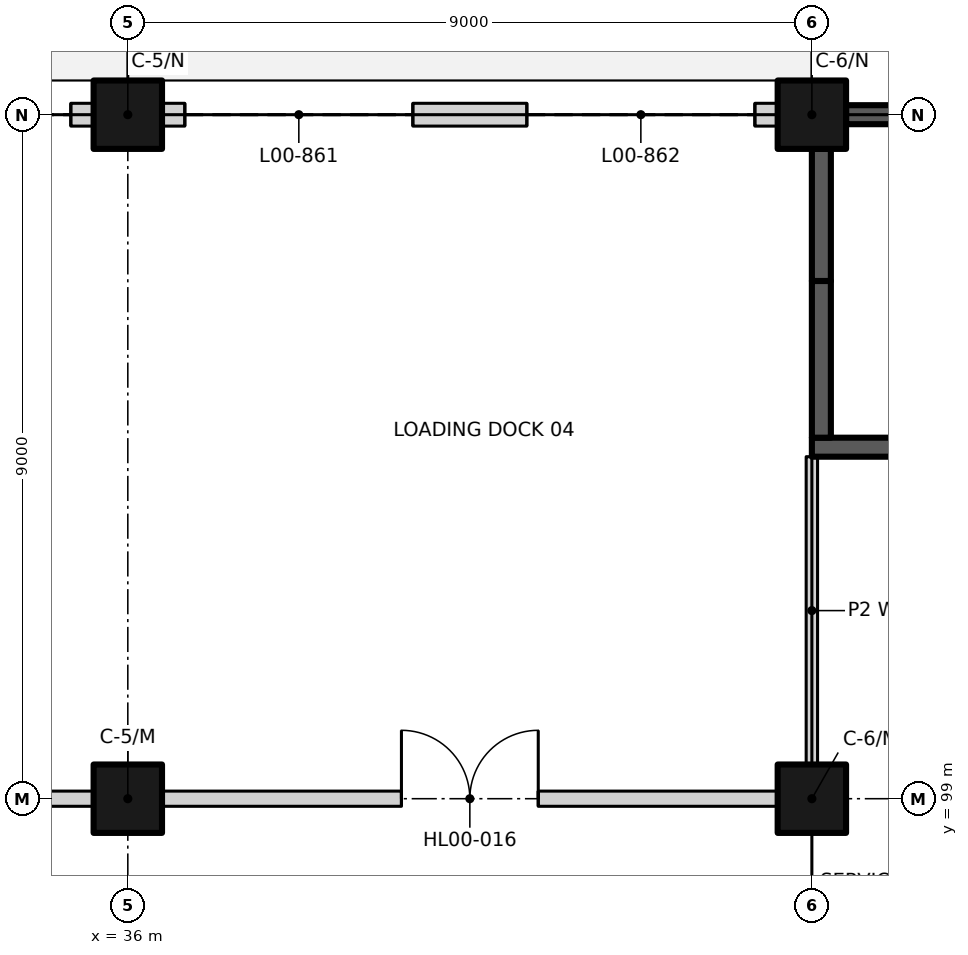
"""IFC4 building model, lengths in metres.
Left out: names, types, materials, properties, quantities, classifications, styles, units other than length and angle.
Written with IfcOpenShell. Run it as: python <this file> out.ifc"""

import sys

from ifc_helpers import new_model, si_unit, direction, frame, frame_2d, origin, origin_2d, place, context, subcontext, project, spatial, rectangle, extrude, element, fill, save


model = new_model("IFC4")
c1 = context("Model", 3, precision=1e-05, world=origin(), true_north=direction((0.0, 1.0)))
c2 = subcontext(c1, "Body", "Model", "MODEL_VIEW")
j1 = project(units=[si_unit("LENGTHUNIT", "METRE"), si_unit("PLANEANGLEUNIT", "RADIAN")], contexts=[c1])
p1 = place(None, origin())
s1 = spatial("IfcSite", under=j1, at=p1, CompositionType="ELEMENT")
p2 = place(p1, origin())
s2 = spatial("IfcBuilding", under=s1, at=p2, CompositionType="ELEMENT")
p3 = place(p2, origin())
s3 = spatial("IfcBuildingStorey", under=s2, at=p3, CompositionType="ELEMENT", Elevation=0.0)
for number, where, z_axis, x_axis in (
    (1, (36.0, 99.0, 0.0), (0.0, 0.0, 1.0), (1.0, 0.0, 0.0)),
    (2, (45.0, 99.0, 0.0), (0.0, 0.0, 1.0), (1.0, 0.0, 0.0)),
    (3, (36.0, 108.0, 0.0), (0.0, 0.0, 1.0), (1.0, 0.0, 0.0)),
    (4, (45.0, 108.0, 0.0), (0.0, 0.0, 1.0), (1.0, 0.0, 0.0)),
):
    element("IfcColumn", number, at=place(p3, frame(where, z_axis=z_axis, x_axis=x_axis)), inside=s3, PredefinedType="COLUMN", context=c2, shape_type="SweptSolid", body=[
        extrude(rectangle(XDim=0.9, YDim=0.9, at=origin_2d()), origin(), (0.0, 0.0, 1.0), 6.0),
    ])
p4 = place(p3, frame((45.0, 103.625, 0.0), z_axis=(0.0, 0.0, 1.0), x_axis=(1.0, 0.0, 0.0)))
e5 = element("IfcWall", 5, at=p4, inside=s3, PredefinedType="SHEAR", context=c2, shape_type="SweptSolid", body=[
    extrude(rectangle(XDim=9.0, YDim=0.25, at=frame_2d((4.5, 0.0))), origin(), (0.0, 0.0, 1.0), 6.0),
])
p5 = place(p3, frame((45.45, 108.0, 0.0), z_axis=(0.0, 0.0, 1.0), x_axis=(1.0, 0.0, 0.0)))
e6 = element("IfcWall", 6, at=p5, inside=s3, PredefinedType="SHEAR", context=c2, shape_type="SweptSolid", body=[
    extrude(rectangle(XDim=8.1, YDim=0.25, at=frame_2d((4.05, 0.0))), origin(), (0.0, 0.0, 1.0), 6.0),
])
p6 = place(p5, frame((6.55, 0.0, 0.0)))
e7 = element("IfcOpeningElement", 7, at=p6, cuts=e6, PredefinedType="OPENING", context=c2, shape_type="SweptSolid", body=[
    extrude(rectangle(XDim=1.4, YDim=2.1, at=frame_2d((0.7, 1.05))), frame((0.0, 0.135, 0.0), z_axis=(0.0, -1.0, 0.0), x_axis=(1.0, 0.0, 0.0)), (0.0, 0.0, 1.0), 0.27),
])
p7 = place(p3, frame((45.125, 103.75, 0.0), z_axis=(0.0, 0.0, 1.0), x_axis=(0.0, 1.0, 0.0)))
e8 = element("IfcWall", 8, at=p7, inside=s3, PredefinedType="SHEAR", context=c2, shape_type="SweptSolid", body=[
    extrude(rectangle(XDim=2.062, YDim=0.25, at=frame_2d((1.031, 0.0))), origin(), (0.0, 0.0, 1.0), 6.0),
])
p8 = place(p3, frame((45.125, 105.812, 0.0), z_axis=(0.0, 0.0, 1.0), x_axis=(0.0, 1.0, 0.0)))
e9 = element("IfcWall", 9, at=p8, inside=s3, PredefinedType="SHEAR", context=c2, shape_type="SweptSolid", body=[
    extrude(rectangle(XDim=1.738, YDim=0.25, at=frame_2d((0.869, 0.0))), origin(), (0.0, 0.0, 1.0), 6.0),
])
p9 = place(p3, frame((27.45, 108.0, 0.0), z_axis=(0.0, 0.0, 1.0), x_axis=(1.0, 0.0, 0.0)))
e10 = element("IfcWall", 10, at=p9, inside=s3, PredefinedType="SOLIDWALL", context=c2, shape_type="SweptSolid", body=[
    extrude(rectangle(XDim=8.1, YDim=0.3, at=frame_2d((4.05, 0.0))), origin(), (0.0, 0.0, 1.0), 5.2),
])
p10 = place(p9, frame((0.3, 0.0, 0.0)))
e11 = element("IfcOpeningElement", 11, at=p10, cuts=e10, PredefinedType="OPENING", context=c2, shape_type="SweptSolid", body=[
    extrude(rectangle(XDim=3.0, YDim=4.2, at=frame_2d((1.5, 2.1))), frame((0.0, 0.16, 0.0), z_axis=(0.0, -1.0, 0.0), x_axis=(1.0, 0.0, 0.0)), (0.0, 0.0, 1.0), 0.32),
])
p11 = place(p9, frame((4.8, 0.0, 0.0)))
e12 = element("IfcOpeningElement", 12, at=p11, cuts=e10, PredefinedType="OPENING", context=c2, shape_type="SweptSolid", body=[
    extrude(rectangle(XDim=3.0, YDim=4.2, at=frame_2d((1.5, 2.1))), frame((0.0, 0.16, 0.0), z_axis=(0.0, -1.0, 0.0), x_axis=(1.0, 0.0, 0.0)), (0.0, 0.0, 1.0), 0.32),
])
p12 = place(p3, frame((36.45, 108.0, 0.0), z_axis=(0.0, 0.0, 1.0), x_axis=(1.0, 0.0, 0.0)))
e13 = element("IfcWall", 13, at=p12, inside=s3, PredefinedType="SOLIDWALL", context=c2, shape_type="SweptSolid", body=[
    extrude(rectangle(XDim=8.1, YDim=0.3, at=frame_2d((4.05, 0.0))), origin(), (0.0, 0.0, 1.0), 5.2),
])
p13 = place(p12, frame((0.3, 0.0, 0.0)))
e14 = element("IfcOpeningElement", 14, at=p13, cuts=e13, PredefinedType="OPENING", context=c2, shape_type="SweptSolid", body=[
    extrude(rectangle(XDim=3.0, YDim=4.2, at=frame_2d((1.5, 2.1))), frame((0.0, 0.16, 0.0), z_axis=(0.0, -1.0, 0.0), x_axis=(1.0, 0.0, 0.0)), (0.0, 0.0, 1.0), 0.32),
])
p14 = place(p12, frame((4.8, 0.0, 0.0)))
e15 = element("IfcOpeningElement", 15, at=p14, cuts=e13, PredefinedType="OPENING", context=c2, shape_type="SweptSolid", body=[
    extrude(rectangle(XDim=3.0, YDim=4.2, at=frame_2d((1.5, 2.1))), frame((0.0, 0.16, 0.0), z_axis=(0.0, -1.0, 0.0), x_axis=(1.0, 0.0, 0.0)), (0.0, 0.0, 1.0), 0.32),
])
p15 = place(p3, frame((27.45, 99.0, 0.0), z_axis=(0.0, 0.0, 1.0), x_axis=(1.0, 0.0, 0.0)))
e16 = element("IfcWall", 16, at=p15, inside=s3, PredefinedType="PARTITIONING", context=c2, shape_type="SweptSolid", body=[
    extrude(rectangle(XDim=8.1, YDim=0.2, at=frame_2d((4.05, 0.0))), origin(), (0.0, 0.0, 1.0), 5.7),
])
p16 = place(p15, frame((3.15, 0.0, 0.0)))
e17 = element("IfcOpeningElement", 17, at=p16, cuts=e16, PredefinedType="OPENING", context=c2, shape_type="SweptSolid", body=[
    extrude(rectangle(XDim=1.8, YDim=2.4, at=frame_2d((0.9, 1.2))), frame((0.0, 0.11, 0.0), z_axis=(0.0, -1.0, 0.0), x_axis=(1.0, 0.0, 0.0)), (0.0, 0.0, 1.0), 0.22),
])
p17 = place(p3, frame((36.45, 99.0, 0.0), z_axis=(0.0, 0.0, 1.0), x_axis=(1.0, 0.0, 0.0)))
e18 = element("IfcWall", 18, at=p17, inside=s3, PredefinedType="PARTITIONING", context=c2, shape_type="SweptSolid", body=[
    extrude(rectangle(XDim=8.1, YDim=0.2, at=frame_2d((4.05, 0.0))), origin(), (0.0, 0.0, 1.0), 5.7),
])
p18 = place(p17, frame((3.15, 0.0, 0.0)))
e19 = element("IfcOpeningElement", 19, at=p18, cuts=e18, PredefinedType="OPENING", context=c2, shape_type="SweptSolid", body=[
    extrude(rectangle(XDim=1.8, YDim=2.4, at=frame_2d((0.9, 1.2))), frame((0.0, 0.11, 0.0), z_axis=(0.0, -1.0, 0.0), x_axis=(1.0, 0.0, 0.0)), (0.0, 0.0, 1.0), 0.22),
])
p19 = place(p3, frame((45.0, 99.45, 0.0), z_axis=(0.0, 0.0, 1.0), x_axis=(0.0, 1.0, 0.0)))
e20 = element("IfcWall", 20, at=p19, inside=s3, PredefinedType="PARTITIONING", context=c2, shape_type="SweptSolid", body=[
    extrude(rectangle(XDim=4.05, YDim=0.15, at=frame_2d((2.025, 0.0))), origin(), (0.0, 0.0, 1.0), 5.7),
])
p20 = place(p11, origin())
e21 = element("IfcDoor", 21, at=p20, inside=s3, OperationType="ROLLINGUP", PredefinedType="DOOR", context=c2, shape_type="SweptSolid", body=[
    extrude(rectangle(XDim=3.0, YDim=4.2, at=frame_2d((1.5, 2.1))), frame((0.0, 0.025, 0.0), z_axis=(0.0, -1.0, 0.0), x_axis=(1.0, 0.0, 0.0)), (0.0, 0.0, 1.0), 0.05),
])
fill(e12, e21)
p21 = place(p13, origin())
e22 = element("IfcDoor", 22, at=p21, inside=s3, OperationType="ROLLINGUP", PredefinedType="DOOR", context=c2, shape_type="SweptSolid", body=[
    extrude(rectangle(XDim=3.0, YDim=4.2, at=frame_2d((1.5, 2.1))), frame((0.0, 0.025, 0.0), z_axis=(0.0, -1.0, 0.0), x_axis=(1.0, 0.0, 0.0)), (0.0, 0.0, 1.0), 0.05),
])
fill(e14, e22)
p22 = place(p14, origin())
e23 = element("IfcDoor", 23, at=p22, inside=s3, OperationType="ROLLINGUP", PredefinedType="DOOR", context=c2, shape_type="SweptSolid", body=[
    extrude(rectangle(XDim=3.0, YDim=4.2, at=frame_2d((1.5, 2.1))), frame((0.0, 0.025, 0.0), z_axis=(0.0, -1.0, 0.0), x_axis=(1.0, 0.0, 0.0)), (0.0, 0.0, 1.0), 0.05),
])
fill(e15, e23)
p23 = place(p18, origin())
e24 = element("IfcDoor", 24, at=p23, inside=s3, OperationType="DOUBLE_DOOR_SINGLE_SWING", PredefinedType="DOOR", context=c2, shape_type="SweptSolid", body=[
    extrude(rectangle(XDim=1.8, YDim=2.4, at=frame_2d((0.9, 1.2))), frame((0.0, 0.025, 0.0), z_axis=(0.0, -1.0, 0.0), x_axis=(1.0, 0.0, 0.0)), (0.0, 0.0, 1.0), 0.05),
])
fill(e19, e24)
save(model, sys.argv[1])
